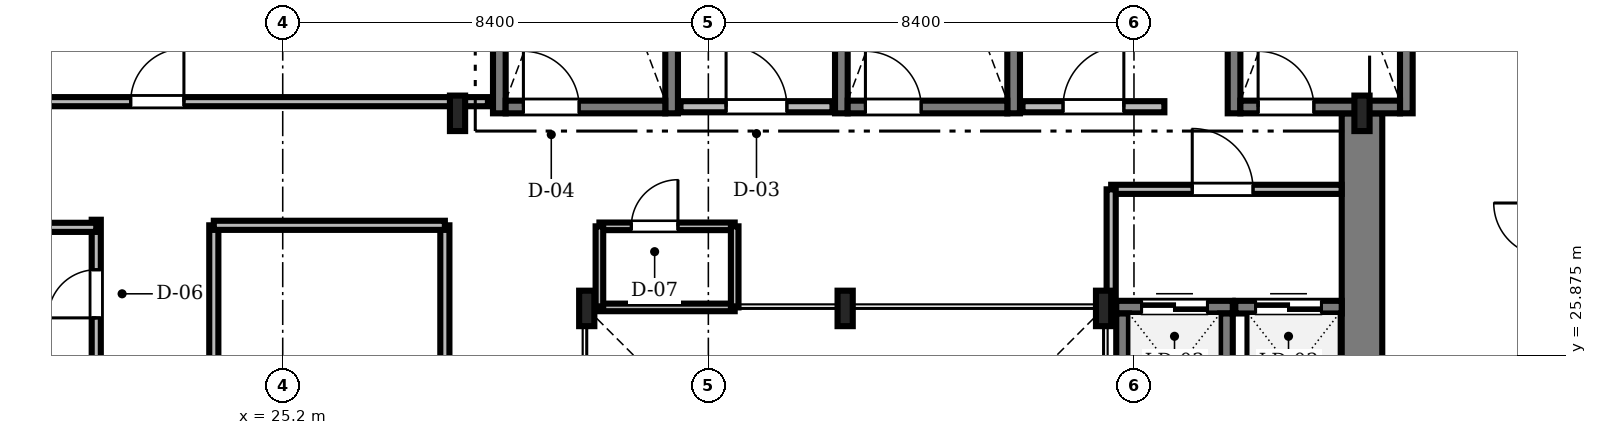
"""IFC4 building model, lengths in metres.
Left out: names, types, materials, properties, quantities, classifications, styles, units other than length and angle.
Written with IfcOpenShell. Run it as: python <this file> out.ifc"""

import sys

from ifc_helpers import new_model, si_unit, direction, frame, frame_2d, origin, origin_2d, place, context, subcontext, project, spatial, rectangle, i_section, extrude, source, transform, mapped, element, fill, save


model = new_model("IFC4")
c1 = context("Model", 3, precision=1e-05, world=origin(), true_north=direction((0.0, 1.0)))
c2 = subcontext(c1, "Body", "Model", "MODEL_VIEW")
j1 = project(units=[si_unit("LENGTHUNIT", "METRE"), si_unit("PLANEANGLEUNIT", "RADIAN")], contexts=[c1])
p1 = place(None, origin())
s1 = spatial("IfcSite", under=j1, at=p1, CompositionType="ELEMENT")
p2 = place(p1, origin())
s2 = spatial("IfcBuilding", under=s1, at=p2, CompositionType="ELEMENT")
p3 = place(p2, frame((0.0, 0.0, 203.55)))
s3 = spatial("IfcBuildingStorey", under=s2, at=p3, CompositionType="ELEMENT", Elevation=203.55)
m1 = source(origin(), c2, "Body", "SweptSolid", [
    extrude(rectangle(XDim=13.15, YDim=0.8, at=frame_2d((6.575, 0.0))), origin(), (0.0, 0.0, 1.0), 3.53),
])
p4 = place(p3, frame((46.5, 17.5, 0.0), z_axis=(0.0, 0.0, 1.0), x_axis=(0.0, 1.0, 0.0)))
e1 = element("IfcWall", 1, at=p4, inside=s3, PredefinedType="SHEAR", context=c2, shape_type="MappedRepresentation", body=[
    mapped(m1, transform((0.0, 0.0, 0.0), scale=1.0)),
])
m2 = source(origin(), c2, "Body", "SweptSolid", [
    extrude(i_section(OverallWidth=0.3, OverallDepth=0.7, WebThickness=0.017, FlangeThickness=0.032, FilletRadius=0.027, at=origin_2d()), origin(), (0.0, 0.0, 1.0), 3.53),
])
for number, where, z_axis, x_axis in (
    (2, (41.4, 26.8, 0.0), (0.0, 0.0, 1.0), (1.0, 0.0, 0.0)),
    (3, (36.3, 26.8, 0.0), (0.0, 0.0, 1.0), (1.0, 0.0, 0.0)),
    (4, (31.2, 26.8, 0.0), (0.0, 0.0, 1.0), (1.0, 0.0, 0.0)),
    (5, (28.65, 30.65, 0.0), (0.0, 0.0, 1.0), (1.0, 0.0, 0.0)),
    (6, (46.5, 30.65, 0.0), (0.0, 0.0, 1.0), (1.0, 0.0, 0.0)),
):
    element("IfcColumn", number, at=place(p3, frame(where, z_axis=z_axis, x_axis=x_axis)), inside=s3, PredefinedType="COLUMN", context=c2, shape_type="MappedRepresentation", body=[
        mapped(m2, transform((0.0, 0.0, 0.0), scale=1.0)),
    ])
m3 = source(origin(), c2, "Body", "SweptSolid", [
    extrude(rectangle(XDim=9.25, YDim=0.25, at=frame_2d((4.625, 0.0))), origin(), (0.0, 0.0, 1.0), 3.55),
])
for number, where, z_axis, x_axis in (
    (7, (29.475, 30.65, 0.0), (0.0, 0.0, 1.0), (0.0, 1.0, 0.0)),
    (8, (32.875, 30.65, 0.0), (0.0, 0.0, 1.0), (0.0, 1.0, 0.0)),
):
    element("IfcWall", number, at=place(p3, frame(where, z_axis=z_axis, x_axis=x_axis)), inside=s3, PredefinedType="SOLIDWALL", context=c2, shape_type="MappedRepresentation", body=[
        mapped(m3, transform((0.0, 0.0, 0.0), scale=1.0)),
    ])
m4 = source(origin(), c2, "Body", "SweptSolid", [
    extrude(rectangle(XDim=3.15, YDim=0.25, at=frame_2d((1.575, 0.0))), origin(), (0.0, 0.0, 1.0), 3.55),
])
p5 = place(p3, frame((29.6, 30.775, 0.0), z_axis=(0.0, 0.0, 1.0), x_axis=(1.0, 0.0, 0.0)))
e9 = element("IfcWall", 9, at=p5, inside=s3, PredefinedType="SOLIDWALL", context=c2, shape_type="MappedRepresentation", body=[
    mapped(m4, transform((0.0, 0.0, 0.0), scale=1.0)),
])
m5 = source(origin(), c2, "Body", "SweptSolid", [
    extrude(rectangle(XDim=1.1, YDim=2.2, at=frame_2d((0.55, 1.1))), frame((0.0, 0.135, 0.0), z_axis=(0.0, -1.0, 0.0), x_axis=(1.0, 0.0, 0.0)), (0.0, 0.0, 1.0), 0.27),
])
p6 = place(p5, frame((0.35, 0.0, 0.0)))
e10 = element("IfcOpeningElement", 10, at=p6, cuts=e9, PredefinedType="OPENING", context=c2, shape_type="MappedRepresentation", body=[
    mapped(m5, transform((0.0, 0.0, 0.0), scale=1.0)),
])
for number, where, z_axis, x_axis in (
    (11, (36.225, 30.65, 0.0), (0.0, 0.0, 1.0), (0.0, 1.0, 0.0)),
    (12, (39.625, 30.65, 0.0), (0.0, 0.0, 1.0), (0.0, 1.0, 0.0)),
):
    element("IfcWall", number, at=place(p3, frame(where, z_axis=z_axis, x_axis=x_axis)), inside=s3, PredefinedType="SOLIDWALL", context=c2, shape_type="MappedRepresentation", body=[
        mapped(m3, transform((0.0, 0.0, 0.0), scale=1.0)),
    ])
p7 = place(p3, frame((36.35, 30.775, 0.0), z_axis=(0.0, 0.0, 1.0), x_axis=(1.0, 0.0, 0.0)))
e13 = element("IfcWall", 13, at=p7, inside=s3, PredefinedType="SOLIDWALL", context=c2, shape_type="MappedRepresentation", body=[
    mapped(m4, transform((0.0, 0.0, 0.0), scale=1.0)),
])
p8 = place(p7, frame((0.35, 0.0, 0.0)))
e14 = element("IfcOpeningElement", 14, at=p8, cuts=e13, PredefinedType="OPENING", context=c2, shape_type="MappedRepresentation", body=[
    mapped(m5, transform((0.0, 0.0, 0.0), scale=1.0)),
])
for number, where, z_axis, x_axis in (
    (15, (43.975, 30.65, 0.0), (0.0, 0.0, 1.0), (0.0, 1.0, 0.0)),
    (16, (47.375, 30.65, 0.0), (0.0, 0.0, 1.0), (0.0, 1.0, 0.0)),
):
    element("IfcWall", number, at=place(p3, frame(where, z_axis=z_axis, x_axis=x_axis)), inside=s3, PredefinedType="SOLIDWALL", context=c2, shape_type="MappedRepresentation", body=[
        mapped(m3, transform((0.0, 0.0, 0.0), scale=1.0)),
    ])
p9 = place(p3, frame((44.1, 30.775, 0.0), z_axis=(0.0, 0.0, 1.0), x_axis=(1.0, 0.0, 0.0)))
e17 = element("IfcWall", 17, at=p9, inside=s3, PredefinedType="SOLIDWALL", context=c2, shape_type="MappedRepresentation", body=[
    mapped(m4, transform((0.0, 0.0, 0.0), scale=1.0)),
])
p10 = place(p9, frame((0.35, 0.0, 0.0)))
e18 = element("IfcOpeningElement", 18, at=p10, cuts=e17, PredefinedType="OPENING", context=c2, shape_type="MappedRepresentation", body=[
    mapped(m5, transform((0.0, 0.0, 0.0), scale=1.0)),
])
m6 = source(origin(), c2, "Body", "SweptSolid", [
    extrude(rectangle(XDim=3.0, YDim=0.22, at=frame_2d((1.5, 0.0))), origin(), (0.0, 0.0, 1.0), 3.53),
])
p11 = place(p3, frame((33.05, 30.78, 0.0), z_axis=(0.0, 0.0, 1.0), x_axis=(1.0, 0.0, 0.0)))
e19 = element("IfcWall", 19, at=p11, inside=s3, PredefinedType="SOLIDWALL", context=c2, shape_type="MappedRepresentation", body=[
    mapped(m6, transform((0.0, 0.0, 0.0), scale=1.0)),
])
m7 = source(origin(), c2, "Body", "SweptSolid", [
    extrude(rectangle(XDim=1.2, YDim=2.2, at=frame_2d((0.6, 1.1))), frame((0.0, 0.12, 0.0), z_axis=(0.0, -1.0, 0.0), x_axis=(1.0, 0.0, 0.0)), (0.0, 0.0, 1.0), 0.24),
])
p12 = place(p11, frame((0.9, 0.0, 0.0)))
e20 = element("IfcOpeningElement", 20, at=p12, cuts=e19, PredefinedType="OPENING", context=c2, shape_type="MappedRepresentation", body=[
    mapped(m7, transform((0.0, 0.0, 0.0), scale=1.0)),
])
m8 = source(origin(), c2, "Body", "SweptSolid", [
    extrude(rectangle(XDim=2.8, YDim=0.22, at=frame_2d((1.4, 0.0))), origin(), (0.0, 0.0, 1.0), 3.53),
])
p13 = place(p3, frame((39.8, 30.78, 0.0), z_axis=(0.0, 0.0, 1.0), x_axis=(1.0, 0.0, 0.0)))
e21 = element("IfcWall", 21, at=p13, inside=s3, PredefinedType="SOLIDWALL", context=c2, shape_type="MappedRepresentation", body=[
    mapped(m8, transform((0.0, 0.0, 0.0), scale=1.0)),
])
p14 = place(p13, frame((0.8, 0.0, 0.0)))
e22 = element("IfcOpeningElement", 22, at=p14, cuts=e21, PredefinedType="OPENING", context=c2, shape_type="MappedRepresentation", body=[
    mapped(m7, transform((0.0, 0.0, 0.0), scale=1.0)),
])
m9 = source(origin(), c2, "Body", "SweptSolid", [
    extrude(rectangle(XDim=2.3, YDim=0.25, at=frame_2d((1.15, 0.0))), origin(), (0.0, 0.0, 1.0), 3.53),
])
p15 = place(p3, frame((41.65, 26.825, 0.0), z_axis=(0.0, 0.0, 1.0), x_axis=(1.0, 0.0, 0.0)))
e23 = element("IfcWall", 23, at=p15, inside=s3, PredefinedType="SOLIDWALL", context=c2, shape_type="MappedRepresentation", body=[
    mapped(m9, transform((0.0, 0.0, 0.0), scale=1.0)),
])
m10 = source(origin(), c2, "Body", "SweptSolid", [
    extrude(rectangle(XDim=1.3, YDim=2.3, at=frame_2d((0.65, 1.15))), frame((0.0, 0.135, 0.0), z_axis=(0.0, -1.0, 0.0), x_axis=(1.0, 0.0, 0.0)), (0.0, 0.0, 1.0), 0.27),
])
p16 = place(p15, frame((0.5, 0.0, 0.0)))
e24 = element("IfcOpeningElement", 24, at=p16, cuts=e23, PredefinedType="OPENING", context=c2, shape_type="MappedRepresentation", body=[
    mapped(m10, transform((0.0, 0.0, 0.0), scale=1.0)),
])
for number, where, z_axis, x_axis in (
    (25, (41.775, 24.4, 0.0), (0.0, 0.0, 1.0), (0.0, 1.0, 0.0)),
    (26, (43.825, 24.4, 0.0), (0.0, 0.0, 1.0), (0.0, 1.0, 0.0)),
):
    element("IfcWall", number, at=place(p3, frame(where, z_axis=z_axis, x_axis=x_axis)), inside=s3, PredefinedType="SOLIDWALL", context=c2, shape_type="MappedRepresentation", body=[
        mapped(m9, transform((0.0, 0.0, 0.0), scale=1.0)),
    ])
m11 = source(origin(), c2, "Body", "SweptSolid", [
    extrude(rectangle(XDim=2.1, YDim=0.25, at=frame_2d((1.05, 0.0))), origin(), (0.0, 0.0, 1.0), 3.53),
])
p17 = place(p3, frame((44.0, 26.825, 0.0), z_axis=(0.0, 0.0, 1.0), x_axis=(1.0, 0.0, 0.0)))
e27 = element("IfcWall", 27, at=p17, inside=s3, PredefinedType="SOLIDWALL", context=c2, shape_type="MappedRepresentation", body=[
    mapped(m11, transform((0.0, 0.0, 0.0), scale=1.0)),
])
p18 = place(p17, frame((0.4, 0.0, 0.0)))
e28 = element("IfcOpeningElement", 28, at=p18, cuts=e27, PredefinedType="OPENING", context=c2, shape_type="MappedRepresentation", body=[
    mapped(m10, transform((0.0, 0.0, 0.0), scale=1.0)),
])
m12 = source(origin(), c2, "Body", "SweptSolid", [
    extrude(rectangle(XDim=17.828, YDim=0.18, at=frame_2d((8.914, 0.0))), origin(), (0.0, 0.0, 1.0), 2.772),
])
p19 = place(p3, frame((11.422, 30.88, 0.0), z_axis=(0.0, 0.0, 1.0), x_axis=(1.0, 0.0, 0.0)))
e29 = element("IfcWall", 29, at=p19, inside=s3, PredefinedType="PARTITIONING", context=c2, shape_type="MappedRepresentation", body=[
    mapped(m12, transform((0.0, 0.0, 0.0), scale=1.0)),
])
m13 = source(origin(), c2, "Body", "SweptSolid", [
    extrude(rectangle(XDim=1.05, YDim=2.2, at=frame_2d((0.525, 1.1))), frame((0.0, 0.1, 0.0), z_axis=(0.0, -1.0, 0.0), x_axis=(1.0, 0.0, 0.0)), (0.0, 0.0, 1.0), 0.2),
])
p20 = place(p19, frame((10.778, 0.0, 0.0)))
e30 = element("IfcOpeningElement", 30, at=p20, cuts=e29, PredefinedType="OPENING", context=c2, shape_type="MappedRepresentation", body=[
    mapped(m13, transform((0.0, 0.0, 0.0), scale=1.0)),
])
m14 = source(origin(), c2, "Body", "SweptSolid", [
    extrude(rectangle(XDim=15.1, YDim=0.18, at=frame_2d((7.55, 0.0))), origin(), (0.0, 0.0, 1.0), 2.972),
])
p21 = place(p3, frame((21.52, 13.45, 0.0), z_axis=(0.0, 0.0, 1.0), x_axis=(0.0, 1.0, 0.0)))
e31 = element("IfcWall", 31, at=p21, inside=s3, PredefinedType="PARTITIONING", context=c2, shape_type="MappedRepresentation", body=[
    mapped(m14, transform((0.0, 0.0, 0.0), scale=1.0)),
])
p22 = place(p21, frame((1.972, 0.0, 0.0)))
e32 = element("IfcOpeningElement", 32, at=p22, cuts=e31, PredefinedType="OPENING", context=c2, shape_type="MappedRepresentation", body=[
    mapped(m13, transform((0.0, 0.0, 0.0), scale=1.0)),
])
m15 = source(origin(), c2, "Body", "SweptSolid", [
    extrude(rectangle(XDim=0.95, YDim=2.15, at=frame_2d((0.475, 1.075))), frame((0.0, 0.1, 0.0), z_axis=(0.0, -1.0, 0.0), x_axis=(1.0, 0.0, 0.0)), (0.0, 0.0, 1.0), 0.2),
])
p23 = place(p21, frame((8.18, 0.0, 0.0)))
e33 = element("IfcOpeningElement", 33, at=p23, cuts=e31, PredefinedType="OPENING", context=c2, shape_type="MappedRepresentation", body=[
    mapped(m15, transform((0.0, 0.0, 0.0), scale=1.0)),
])
p24 = place(p21, frame((13.163, 0.0, 0.0)))
e34 = element("IfcOpeningElement", 34, at=p24, cuts=e31, PredefinedType="OPENING", context=c2, shape_type="MappedRepresentation", body=[
    mapped(m15, transform((0.0, 0.0, 0.0), scale=1.0)),
])
m16 = source(origin(), c2, "Body", "SweptSolid", [
    extrude(rectangle(XDim=6.54, YDim=0.18, at=frame_2d((3.27, 0.0))), origin(), (0.0, 0.0, 1.0), 2.972),
])
p25 = place(p3, frame((23.84, 21.9, 0.0), z_axis=(0.0, 0.0, 1.0), x_axis=(0.0, 1.0, 0.0)))
e35 = element("IfcWall", 35, at=p25, inside=s3, PredefinedType="PARTITIONING", context=c2, shape_type="MappedRepresentation", body=[
    mapped(m16, transform((0.0, 0.0, 0.0), scale=1.0)),
])
p26 = place(p25, frame((2.2, 0.0, 0.0)))
e36 = element("IfcOpeningElement", 36, at=p26, cuts=e35, PredefinedType="OPENING", context=c2, shape_type="MappedRepresentation", body=[
    mapped(m13, transform((0.0, 0.0, 0.0), scale=1.0)),
])
m17 = source(origin(), c2, "Body", "SweptSolid", [
    extrude(rectangle(XDim=4.548, YDim=0.18, at=frame_2d((2.274, 0.0))), origin(), (0.0, 0.0, 1.0), 3.162),
])
p27 = place(p3, frame((41.55, 29.15, 0.0), z_axis=(0.0, 0.0, 1.0), x_axis=(1.0, 0.0, 0.0)))
e37 = element("IfcWall", 37, at=p27, inside=s3, PredefinedType="PARTITIONING", context=c2, shape_type="MappedRepresentation", body=[
    mapped(m17, transform((0.0, 0.0, 0.0), scale=1.0)),
])
m18 = source(origin(), c2, "Body", "SweptSolid", [
    extrude(rectangle(XDim=1.2, YDim=2.2, at=frame_2d((0.6, 1.1))), frame((0.0, 0.1, 0.0), z_axis=(0.0, -1.0, 0.0), x_axis=(1.0, 0.0, 0.0)), (0.0, 0.0, 1.0), 0.2),
])
p28 = place(p27, frame((1.6, 0.0, 0.0)))
e38 = element("IfcOpeningElement", 38, at=p28, cuts=e37, PredefinedType="OPENING", context=c2, shape_type="MappedRepresentation", body=[
    mapped(m18, transform((0.0, 0.0, 0.0), scale=1.0)),
])
m19 = source(origin(), c2, "Body", "SweptSolid", [
    extrude(rectangle(XDim=2.67, YDim=0.15, at=frame_2d((1.335, 0.0))), origin(), (0.0, 0.0, 1.0), 3.162),
])
p29 = place(p3, frame((31.45, 28.42, 0.0), z_axis=(0.0, 0.0, 1.0), x_axis=(1.0, 0.0, 0.0)))
e39 = element("IfcWall", 39, at=p29, inside=s3, PredefinedType="PARTITIONING", context=c2, shape_type="MappedRepresentation", body=[
    mapped(m19, transform((0.0, 0.0, 0.0), scale=1.0)),
])
m20 = source(origin(), c2, "Body", "SweptSolid", [
    extrude(rectangle(XDim=0.92, YDim=2.1, at=frame_2d((0.46, 1.05))), frame((0.0, 0.085, 0.0), z_axis=(0.0, -1.0, 0.0), x_axis=(1.0, 0.0, 0.0)), (0.0, 0.0, 1.0), 0.17),
])
p30 = place(p29, frame((0.63, 0.0, 0.0)))
e40 = element("IfcOpeningElement", 40, at=p30, cuts=e39, PredefinedType="OPENING", context=c2, shape_type="MappedRepresentation", body=[
    mapped(m20, transform((0.0, 0.0, 0.0), scale=1.0)),
])
m21 = source(origin(), c2, "Body", "SweptSolid", [
    extrude(rectangle(XDim=10.29, YDim=0.18, at=frame_2d((5.145, 0.0))), origin(), (0.0, 0.0, 1.0), 2.772),
])
p31 = place(p3, frame((11.23, 28.4, 0.0), z_axis=(0.0, 0.0, 1.0), x_axis=(1.0, 0.0, 0.0)))
e41 = element("IfcWall", 41, at=p31, inside=s3, PredefinedType="PARTITIONING", context=c2, shape_type="MappedRepresentation", body=[
    mapped(m21, transform((0.0, 0.0, 0.0), scale=1.0)),
])
p32 = place(p3, frame((28.4, 21.9, 0.0), z_axis=(0.0, 0.0, 1.0), x_axis=(0.0, 1.0, 0.0)))
e42 = element("IfcWall", 42, at=p32, inside=s3, PredefinedType="PARTITIONING", context=c2, shape_type="MappedRepresentation", body=[
    mapped(m16, transform((0.0, 0.0, 0.0), scale=1.0)),
])
m22 = source(origin(), c2, "Body", "SweptSolid", [
    extrude(rectangle(XDim=4.56, YDim=0.18, at=frame_2d((2.28, 0.0))), origin(), (0.0, 0.0, 1.0), 3.53),
])
p33 = place(p3, frame((23.84, 28.44, 0.0), z_axis=(0.0, 0.0, 1.0), x_axis=(1.0, 0.0, 0.0)))
e43 = element("IfcWall", 43, at=p33, inside=s3, PredefinedType="PARTITIONING", context=c2, shape_type="MappedRepresentation", body=[
    mapped(m22, transform((0.0, 0.0, 0.0), scale=1.0)),
])
m23 = source(origin(), c2, "Body", "SweptSolid", [
    extrude(rectangle(XDim=2.67, YDim=0.15, at=frame_2d((1.335, 0.0))), origin(), (0.0, 0.0, 1.0), 3.072),
])
p34 = place(p3, frame((31.45, 26.82, 0.0), z_axis=(0.0, 0.0, 1.0), x_axis=(1.0, 0.0, 0.0)))
e44 = element("IfcWall", 44, at=p34, inside=s3, PredefinedType="PARTITIONING", context=c2, shape_type="MappedRepresentation", body=[
    mapped(m23, transform((0.0, 0.0, 0.0), scale=1.0)),
])
m24 = source(origin(), c2, "Body", "SweptSolid", [
    extrude(rectangle(XDim=2.35, YDim=0.18, at=frame_2d((1.175, 0.0))), origin(), (0.0, 0.0, 1.0), 2.972),
])
p35 = place(p3, frame((41.55, 26.8, 0.0), z_axis=(0.0, 0.0, 1.0), x_axis=(0.0, 1.0, 0.0)))
e45 = element("IfcWall", 45, at=p35, inside=s3, PredefinedType="PARTITIONING", context=c2, shape_type="MappedRepresentation", body=[
    mapped(m24, transform((0.0, 0.0, 0.0), scale=1.0)),
])
m25 = source(origin(), c2, "Body", "SweptSolid", [
    extrude(rectangle(XDim=1.6, YDim=0.15, at=frame_2d((0.8, 0.0))), origin(), (0.0, 0.0, 1.0), 3.072),
])
for number, where, z_axis, x_axis in (
    (46, (31.45, 26.82, 0.0), (0.0, 0.0, 1.0), (0.0, 1.0, 0.0)),
    (47, (34.12, 26.82, 0.0), (0.0, 0.0, 1.0), (0.0, 1.0, 0.0)),
):
    element("IfcWall", number, at=place(p3, frame(where, z_axis=z_axis, x_axis=x_axis)), inside=s3, PredefinedType="PARTITIONING", context=c2, shape_type="MappedRepresentation", body=[
        mapped(m25, transform((0.0, 0.0, 0.0), scale=1.0)),
    ])
m26 = source(origin(), c2, "Body", "SweptSolid", [
    extrude(rectangle(XDim=1.1, YDim=2.2, at=frame_2d((0.55, 1.1))), frame((0.0, 0.025, 0.0), z_axis=(0.0, -1.0, 0.0), x_axis=(1.0, 0.0, 0.0)), (0.0, 0.0, 1.0), 0.05),
])
p36 = place(p6, origin())
e48 = element("IfcDoor", 48, at=p36, inside=s3, OperationType="SINGLE_SWING_LEFT", PredefinedType="DOOR", context=c2, shape_type="MappedRepresentation", body=[
    mapped(m26, transform((0.0, 0.0, 0.0), scale=1.0)),
])
fill(e10, e48)
p37 = place(p8, origin())
e49 = element("IfcDoor", 49, at=p37, inside=s3, OperationType="SINGLE_SWING_LEFT", PredefinedType="DOOR", context=c2, shape_type="MappedRepresentation", body=[
    mapped(m26, transform((0.0, 0.0, 0.0), scale=1.0)),
])
fill(e14, e49)
p38 = place(p10, origin())
e50 = element("IfcDoor", 50, at=p38, inside=s3, OperationType="SINGLE_SWING_LEFT", PredefinedType="DOOR", context=c2, shape_type="MappedRepresentation", body=[
    mapped(m26, transform((0.0, 0.0, 0.0), scale=1.0)),
])
fill(e18, e50)
m27 = source(origin(), c2, "Body", "SweptSolid", [
    extrude(rectangle(XDim=1.2, YDim=2.2, at=frame_2d((0.6, 1.1))), frame((0.0, 0.025, 0.0), z_axis=(0.0, -1.0, 0.0), x_axis=(1.0, 0.0, 0.0)), (0.0, 0.0, 1.0), 0.05),
])
p39 = place(p12, origin())
e51 = element("IfcDoor", 51, at=p39, inside=s3, OperationType="SINGLE_SWING_LEFT", PredefinedType="DOOR", context=c2, shape_type="MappedRepresentation", body=[
    mapped(m27, transform((0.0, 0.0, 0.0), scale=1.0)),
])
fill(e20, e51)
p40 = place(p14, origin())
e52 = element("IfcDoor", 52, at=p40, inside=s3, OperationType="SINGLE_SWING_RIGHT", PredefinedType="DOOR", context=c2, shape_type="MappedRepresentation", body=[
    mapped(m27, transform((0.0, 0.0, 0.0), scale=1.0)),
])
fill(e22, e52)
m28 = source(origin(), c2, "Body", "SweptSolid", [
    extrude(rectangle(XDim=1.3, YDim=2.3, at=frame_2d((0.65, 1.15))), frame((0.0, 0.025, 0.0), z_axis=(0.0, -1.0, 0.0), x_axis=(1.0, 0.0, 0.0)), (0.0, 0.0, 1.0), 0.05),
])
p41 = place(p16, origin())
e53 = element("IfcDoor", 53, at=p41, inside=s3, OperationType="DOUBLE_DOOR_SLIDING", PredefinedType="DOOR", context=c2, shape_type="MappedRepresentation", body=[
    mapped(m28, transform((0.0, 0.0, 0.0), scale=1.0)),
])
fill(e24, e53)
p42 = place(p18, origin())
e54 = element("IfcDoor", 54, at=p42, inside=s3, OperationType="DOUBLE_DOOR_SLIDING", PredefinedType="DOOR", context=c2, shape_type="MappedRepresentation", body=[
    mapped(m28, transform((0.0, 0.0, 0.0), scale=1.0)),
])
fill(e28, e54)
m29 = source(origin(), c2, "Body", "SweptSolid", [
    extrude(rectangle(XDim=1.05, YDim=2.2, at=frame_2d((0.525, 1.1))), frame((0.0, 0.025, 0.0), z_axis=(0.0, -1.0, 0.0), x_axis=(1.0, 0.0, 0.0)), (0.0, 0.0, 1.0), 0.05),
])
p43 = place(p20, origin())
e55 = element("IfcDoor", 55, at=p43, inside=s3, OperationType="SINGLE_SWING_RIGHT", PredefinedType="DOOR", context=c2, shape_type="MappedRepresentation", body=[
    mapped(m29, transform((0.0, 0.0, 0.0), scale=1.0)),
])
fill(e30, e55)
m30 = source(origin(), c2, "Body", "SweptSolid", [
    extrude(rectangle(XDim=0.95, YDim=2.15, at=frame_2d((0.475, 1.075))), frame((0.0, 0.025, 0.0), z_axis=(0.0, -1.0, 0.0), x_axis=(1.0, 0.0, 0.0)), (0.0, 0.0, 1.0), 0.05),
])
p44 = place(p24, origin())
e56 = element("IfcDoor", 56, at=p44, inside=s3, OperationType="SINGLE_SWING_LEFT", PredefinedType="DOOR", context=c2, shape_type="MappedRepresentation", body=[
    mapped(m30, transform((0.0, 0.0, 0.0), scale=1.0)),
])
fill(e34, e56)
p45 = place(p28, origin())
e57 = element("IfcDoor", 57, at=p45, inside=s3, OperationType="SINGLE_SWING_LEFT", PredefinedType="DOOR", context=c2, shape_type="MappedRepresentation", body=[
    mapped(m27, transform((0.0, 0.0, 0.0), scale=1.0)),
])
fill(e38, e57)
m31 = source(origin(), c2, "Body", "SweptSolid", [
    extrude(rectangle(XDim=0.92, YDim=2.1, at=frame_2d((0.46, 1.05))), frame((0.0, 0.025, 0.0), z_axis=(0.0, -1.0, 0.0), x_axis=(1.0, 0.0, 0.0)), (0.0, 0.0, 1.0), 0.05),
])
p46 = place(p30, origin())
e58 = element("IfcDoor", 58, at=p46, inside=s3, OperationType="SINGLE_SWING_RIGHT", PredefinedType="DOOR", context=c2, shape_type="MappedRepresentation", body=[
    mapped(m31, transform((0.0, 0.0, 0.0), scale=1.0)),
])
fill(e40, e58)
save(model, sys.argv[1])
